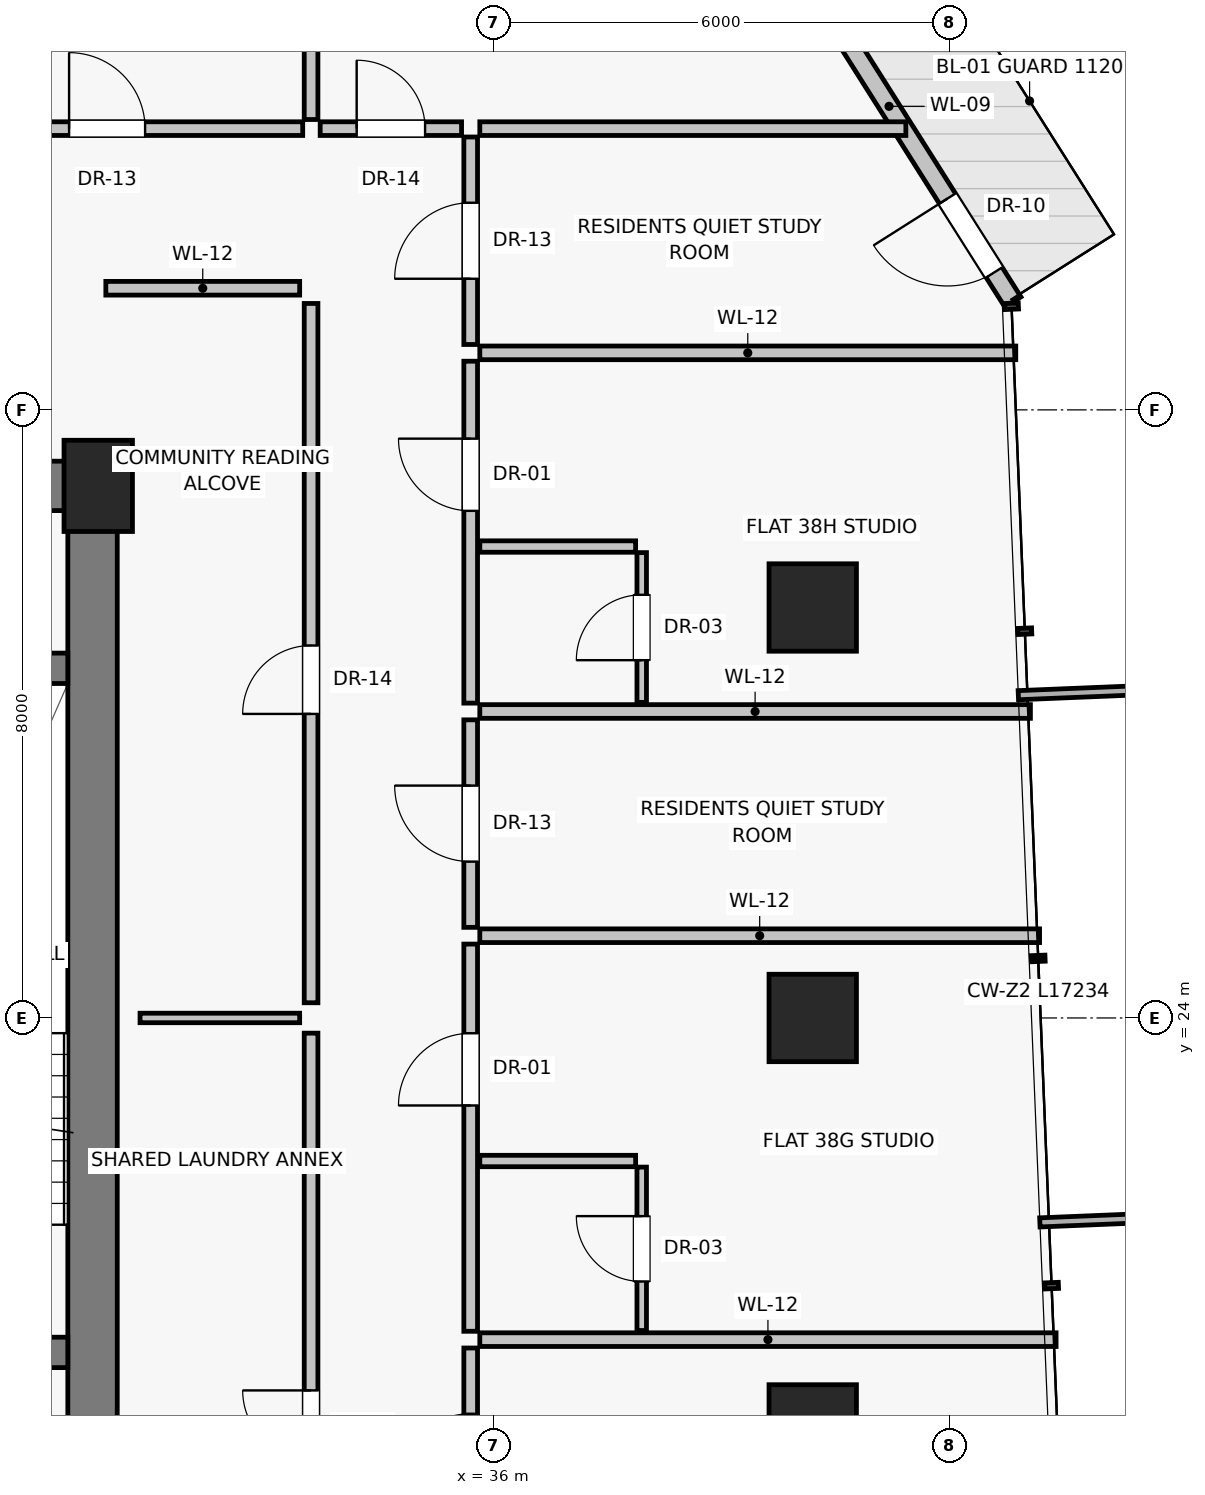
"""IFC4 building model, lengths in metres.
Left out: names, types, materials, properties, quantities, classifications, styles, units other than length and angle.
Written with IfcOpenShell. Run it as: python <this file> out.ifc"""

import sys

from ifc_helpers import new_model, si_unit, direction, frame, frame_2d, origin, origin_2d, place, context, subcontext, project, spatial, rectangle, extrude, source, transform, mapped, element, fill, save


model = new_model("IFC4")
c1 = context("Model", 3, precision=1e-05, world=origin(), true_north=direction((0.0, 1.0)))
c2 = subcontext(c1, "Body", "Model", "MODEL_VIEW")
j1 = project(units=[si_unit("LENGTHUNIT", "METRE"), si_unit("PLANEANGLEUNIT", "RADIAN")], contexts=[c1])
p1 = place(None, origin())
s1 = spatial("IfcSite", under=j1, at=p1, CompositionType="ELEMENT")
p2 = place(p1, origin())
s2 = spatial("IfcBuilding", under=s1, at=p2, CompositionType="ELEMENT")
p3 = place(p2, frame((0.0, 0.0, 136.0)))
s3 = spatial("IfcBuildingStorey", under=s2, at=p3, CompositionType="ELEMENT", Elevation=136.0)
p4 = place(p3, frame((30.8, 31.0, 0.0), z_axis=(0.0, 0.0, 1.0), x_axis=(1.0, 0.0, 0.0)))
e1 = element("IfcColumn", 1, at=p4, inside=s3, PredefinedType="PILASTER", context=c2, shape_type="SweptSolid", body=[
    extrude(rectangle(XDim=0.9, YDim=1.2, at=origin_2d()), origin(), (0.0, 0.0, 1.0), 3.25),
])
for number, where, z_axis, x_axis in (
    (2, (40.2, 18.6, 0.0), (0.0, 0.0, 1.0), (1.0, 0.0, 0.0)),
    (3, (40.2, 24.0, 0.0), (0.0, 0.0, 1.0), (1.0, 0.0, 0.0)),
    (4, (40.2, 29.4, 0.0), (0.0, 0.0, 1.0), (1.0, 0.0, 0.0)),
):
    element("IfcColumn", number, at=place(p3, frame(where, z_axis=z_axis, x_axis=x_axis)), inside=s3, PredefinedType="COLUMN", context=c2, shape_type="SweptSolid", body=[
        extrude(rectangle(XDim=1.15, YDim=1.15, at=origin_2d()), origin(), (0.0, 0.0, 1.0), 3.25),
    ])
p5 = place(p3, frame((42.833, 33.419, 0.0), z_axis=(0.0, 0.0, 1.0), x_axis=(-0.534940933302, 0.84488945897, 0.0)))
e5 = element("IfcWall", 5, at=p5, inside=s3, PredefinedType="SOLIDWALL", context=c2, shape_type="SweptSolid", body=[
    extrude(rectangle(XDim=4.233, YDim=0.25, at=frame_2d((2.116, 0.0))), origin(), (0.0, 0.0, 1.0), 3.0),
])
p6 = place(p5, frame((0.46, 0.0, 0.0)))
e6 = element("IfcOpeningElement", 6, at=p6, cuts=e5, PredefinedType="OPENING", context=c2, shape_type="SweptSolid", body=[
    extrude(rectangle(XDim=1.15, YDim=2.25, at=frame_2d((0.575, 1.125))), frame((0.0, 0.135, 0.0), z_axis=(0.0, -1.0, 0.0), x_axis=(1.0, 0.0, 0.0)), (0.0, 0.0, 1.0), 0.27),
])
p7 = place(p3, frame((30.725, 16.8, 0.0), z_axis=(0.0, 0.0, 1.0), x_axis=(0.0, 1.0, 0.0)))
e7 = element("IfcWall", 7, at=p7, inside=s3, PredefinedType="SHEAR", context=c2, shape_type="SweptSolid", body=[
    extrude(rectangle(XDim=14.2, YDim=0.65, at=frame_2d((7.1, 0.0))), origin(), (0.0, 0.0, 1.0), 3.0),
])
p8 = place(p3, frame((27.0, 31.0, 0.0), z_axis=(0.0, 0.0, 1.0), x_axis=(1.0, 0.0, 0.0)))
e8 = element("IfcWall", 8, at=p8, inside=s3, PredefinedType="SHEAR", context=c2, shape_type="SweptSolid", body=[
    extrude(rectangle(XDim=3.8, YDim=0.65, at=frame_2d((1.9, 0.0))), origin(), (0.0, 0.0, 1.0), 3.0),
])
p9 = place(p8, frame((0.45, 0.0, 0.0)))
e9 = element("IfcOpeningElement", 9, at=p9, cuts=e8, PredefinedType="OPENING", context=c2, shape_type="SweptSolid", body=[
    extrude(rectangle(XDim=0.86, YDim=2.01, at=frame_2d((0.43, 1.005))), frame((0.0, 0.335, 0.0), z_axis=(0.0, -1.0, 0.0), x_axis=(1.0, 0.0, 0.0)), (0.0, 0.0, 1.0), 0.67),
])
p10 = place(p8, frame((1.9, 0.0, 0.0)))
e10 = element("IfcOpeningElement", 10, at=p10, cuts=e8, PredefinedType="OPENING", context=c2, shape_type="SweptSolid", body=[
    extrude(rectangle(XDim=0.86, YDim=2.01, at=frame_2d((0.43, 1.005))), frame((0.0, 0.335, 0.0), z_axis=(0.0, -1.0, 0.0), x_axis=(1.0, 0.0, 0.0)), (0.0, 0.0, 1.0), 0.67),
])
p11 = place(p3, frame((27.0, 19.6, 0.0), z_axis=(0.0, 0.0, 1.0), x_axis=(1.0, 0.0, 0.0)))
e11 = element("IfcWall", 11, at=p11, inside=s3, PredefinedType="SHEAR", context=c2, shape_type="SweptSolid", body=[
    extrude(rectangle(XDim=3.4, YDim=0.4, at=frame_2d((1.7, 0.0))), origin(), (0.0, 0.0, 1.0), 3.0),
])
p12 = place(p11, frame((1.05, 0.0, 0.0)))
e12 = element("IfcOpeningElement", 12, at=p12, cuts=e11, PredefinedType="OPENING", context=c2, shape_type="SweptSolid", body=[
    extrude(rectangle(XDim=1.1, YDim=2.03, at=frame_2d((0.55, 1.015))), frame((0.0, 0.21, 0.0), z_axis=(0.0, -1.0, 0.0), x_axis=(1.0, 0.0, 0.0)), (0.0, 0.0, 1.0), 0.42),
])
p13 = place(p3, frame((27.0, 28.6, 0.0), z_axis=(0.0, 0.0, 1.0), x_axis=(1.0, 0.0, 0.0)))
e13 = element("IfcWall", 13, at=p13, inside=s3, PredefinedType="SHEAR", context=c2, shape_type="SweptSolid", body=[
    extrude(rectangle(XDim=3.4, YDim=0.4, at=frame_2d((1.7, 0.0))), origin(), (0.0, 0.0, 1.0), 3.0),
])
p14 = place(p3, frame((33.6, 14.4, 0.0), z_axis=(0.0, 0.0, 1.0), x_axis=(0.0, 1.0, 0.0)))
e14 = element("IfcWall", 14, at=p14, inside=s3, PredefinedType="PARTITIONING", context=c2, shape_type="SweptSolid", body=[
    extrude(rectangle(XDim=9.4, YDim=0.18, at=frame_2d((4.7, 0.0))), origin(), (0.0, 0.0, 1.0), 3.0),
])
p15 = place(p14, frame((3.8, 0.0, 0.0)))
e15 = element("IfcOpeningElement", 15, at=p15, cuts=e14, PredefinedType="OPENING", context=c2, shape_type="SweptSolid", body=[
    extrude(rectangle(XDim=0.9, YDim=2.01, at=frame_2d((0.45, 1.005))), frame((0.0, 0.1, 0.0), z_axis=(0.0, -1.0, 0.0), x_axis=(1.0, 0.0, 0.0)), (0.0, 0.0, 1.0), 0.2),
])
p16 = place(p3, frame((33.6, 24.2, 0.0), z_axis=(0.0, 0.0, 1.0), x_axis=(0.0, 1.0, 0.0)))
e16 = element("IfcWall", 16, at=p16, inside=s3, PredefinedType="PARTITIONING", context=c2, shape_type="SweptSolid", body=[
    extrude(rectangle(XDim=9.2, YDim=0.18, at=frame_2d((4.6, 0.0))), origin(), (0.0, 0.0, 1.0), 3.0),
])
p17 = place(p16, frame((3.8, 0.0, 0.0)))
e17 = element("IfcOpeningElement", 17, at=p17, cuts=e16, PredefinedType="OPENING", context=c2, shape_type="SweptSolid", body=[
    extrude(rectangle(XDim=0.9, YDim=2.01, at=frame_2d((0.45, 1.005))), frame((0.0, 0.1, 0.0), z_axis=(0.0, -1.0, 0.0), x_axis=(1.0, 0.0, 0.0)), (0.0, 0.0, 1.0), 0.2),
])
p18 = place(p3, frame((31.35, 24.0, 0.0), z_axis=(0.0, 0.0, 1.0), x_axis=(1.0, 0.0, 0.0)))
e18 = element("IfcWall", 18, at=p18, inside=s3, PredefinedType="PARTITIONING", context=c2, shape_type="SweptSolid", body=[
    extrude(rectangle(XDim=2.1, YDim=0.125, at=frame_2d((1.05, 0.0))), origin(), (0.0, 0.0, 1.0), 3.0),
])
p19 = place(p3, frame((30.9, 33.6, 0.0), z_axis=(0.0, 0.0, 1.0), x_axis=(1.0, 0.0, 0.0)))
e19 = element("IfcWall", 19, at=p19, inside=s3, PredefinedType="PARTITIONING", context=c2, shape_type="SweptSolid", body=[
    extrude(rectangle(XDim=2.55, YDim=0.18, at=frame_2d((1.275, 0.0))), origin(), (0.0, 0.0, 1.0), 3.0),
])
p20 = place(p3, frame((33.6, 35.82, 0.0), z_axis=(0.0, 0.0, 1.0), x_axis=(0.0, 1.0, 0.0)))
e20 = element("IfcWall", 20, at=p20, inside=s3, PredefinedType="PARTITIONING", context=c2, shape_type="SweptSolid", body=[
    extrude(rectangle(XDim=4.84, YDim=0.18, at=frame_2d((2.42, 0.0))), origin(), (0.0, 0.0, 1.0), 3.0),
])
p21 = place(p3, frame((28.343, 35.7, 0.0), z_axis=(0.0, 0.0, 1.0), x_axis=(1.0, 0.0, 0.0)))
e21 = element("IfcWall", 21, at=p21, inside=s3, PredefinedType="PARTITIONING", context=c2, shape_type="SweptSolid", body=[
    extrude(rectangle(XDim=5.147, YDim=0.18, at=frame_2d((2.573, 0.0))), origin(), (0.0, 0.0, 1.0), 2.58),
])
p22 = place(p21, frame((2.073, 0.0, 0.0)))
e22 = element("IfcOpeningElement", 22, at=p22, cuts=e21, PredefinedType="OPENING", context=c2, shape_type="SweptSolid", body=[
    extrude(rectangle(XDim=1.0, YDim=2.01, at=frame_2d((0.5, 1.005))), frame((0.0, 0.1, 0.0), z_axis=(0.0, -1.0, 0.0), x_axis=(1.0, 0.0, 0.0)), (0.0, 0.0, 1.0), 0.2),
])
p23 = place(p3, frame((35.82, 35.7, 0.0), z_axis=(0.0, 0.0, 1.0), x_axis=(1.0, 0.0, 0.0)))
e23 = element("IfcWall", 23, at=p23, inside=s3, PredefinedType="PARTITIONING", context=c2, shape_type="SweptSolid", body=[
    extrude(rectangle(XDim=5.605, YDim=0.18, at=frame_2d((2.802, 0.0))), origin(), (0.0, 0.0, 1.0), 3.0),
])
p24 = place(p3, frame((35.7, 16.928, 0.0), z_axis=(0.0, 0.0, 1.0), x_axis=(0.0, 1.0, 0.0)))
e24 = element("IfcWall", 24, at=p24, inside=s3, PredefinedType="PARTITIONING", context=c2, shape_type="SweptSolid", body=[
    extrude(rectangle(XDim=2.73, YDim=0.18, at=frame_2d((1.365, 0.0))), origin(), (0.0, 0.0, 1.0), 2.58),
])
p25 = place(p24, frame((0.865, 0.0, 0.0)))
e25 = element("IfcOpeningElement", 25, at=p25, cuts=e24, PredefinedType="OPENING", context=c2, shape_type="SweptSolid", body=[
    extrude(rectangle(XDim=1.0, YDim=2.01, at=frame_2d((0.5, 1.005))), frame((0.0, 0.1, 0.0), z_axis=(0.0, -1.0, 0.0), x_axis=(1.0, 0.0, 0.0)), (0.0, 0.0, 1.0), 0.2),
])
p26 = place(p3, frame((35.82, 19.768, 0.0), z_axis=(0.0, 0.0, 1.0), x_axis=(1.0, 0.0, 0.0)))
e26 = element("IfcWall", 26, at=p26, inside=s3, PredefinedType="PARTITIONING", context=c2, shape_type="SweptSolid", body=[
    extrude(rectangle(XDim=7.582, YDim=0.18, at=frame_2d((3.791, 0.0))), origin(), (0.0, 0.0, 1.0), 3.0),
])
p27 = place(p3, frame((35.7, 25.192, 0.0), z_axis=(0.0, 0.0, 1.0), x_axis=(0.0, 1.0, 0.0)))
e27 = element("IfcWall", 27, at=p27, inside=s3, PredefinedType="PARTITIONING", context=c2, shape_type="SweptSolid", body=[
    extrude(rectangle(XDim=2.73, YDim=0.18, at=frame_2d((1.365, 0.0))), origin(), (0.0, 0.0, 1.0), 2.58),
])
p28 = place(p27, frame((0.865, 0.0, 0.0)))
e28 = element("IfcOpeningElement", 28, at=p28, cuts=e27, PredefinedType="OPENING", context=c2, shape_type="SweptSolid", body=[
    extrude(rectangle(XDim=1.0, YDim=2.01, at=frame_2d((0.5, 1.005))), frame((0.0, 0.1, 0.0), z_axis=(0.0, -1.0, 0.0), x_axis=(1.0, 0.0, 0.0)), (0.0, 0.0, 1.0), 0.2),
])
p29 = place(p3, frame((35.82, 25.082, 0.0), z_axis=(0.0, 0.0, 1.0), x_axis=(1.0, 0.0, 0.0)))
e29 = element("IfcWall", 29, at=p29, inside=s3, PredefinedType="PARTITIONING", context=c2, shape_type="SweptSolid", body=[
    extrude(rectangle(XDim=7.364, YDim=0.18, at=frame_2d((3.682, 0.0))), origin(), (0.0, 0.0, 1.0), 3.0),
])
p30 = place(p3, frame((35.7, 19.878, 0.0), z_axis=(0.0, 0.0, 1.0), x_axis=(0.0, 1.0, 0.0)))
e30 = element("IfcWall", 30, at=p30, inside=s3, PredefinedType="PARTITIONING", context=c2, shape_type="SweptSolid", body=[
    extrude(rectangle(XDim=5.094, YDim=0.18, at=frame_2d((2.547, 0.0))), origin(), (0.0, 0.0, 1.0), 2.58),
])
p31 = place(p30, frame((2.971, 0.0, 0.0)))
e31 = element("IfcOpeningElement", 31, at=p31, cuts=e30, PredefinedType="OPENING", context=c2, shape_type="SweptSolid", body=[
    extrude(rectangle(XDim=0.95, YDim=2.02, at=frame_2d((0.475, 1.01))), frame((0.0, 0.1, 0.0), z_axis=(0.0, -1.0, 0.0), x_axis=(1.0, 0.0, 0.0)), (0.0, 0.0, 1.0), 0.2),
])
p32 = place(p3, frame((35.82, 22.118, 0.0), z_axis=(0.0, 0.0, 1.0), x_axis=(1.0, 0.0, 0.0)))
e32 = element("IfcWall", 32, at=p32, inside=s3, PredefinedType="PARTITIONING", context=c2, shape_type="SweptSolid", body=[
    extrude(rectangle(XDim=2.05, YDim=0.15, at=frame_2d((1.025, 0.0))), origin(), (0.0, 0.0, 1.0), 3.0),
])
p33 = place(p3, frame((37.95, 19.888, 0.0), z_axis=(0.0, 0.0, 1.0), x_axis=(0.0, 1.0, 0.0)))
e33 = element("IfcWall", 33, at=p33, inside=s3, PredefinedType="PARTITIONING", context=c2, shape_type="SweptSolid", body=[
    extrude(rectangle(XDim=2.15, YDim=0.125, at=frame_2d((1.075, 0.0))), origin(), (0.0, 0.0, 1.0), 3.0),
])
p34 = place(p33, frame((0.645, 0.0, 0.0)))
e34 = element("IfcOpeningElement", 34, at=p34, cuts=e33, PredefinedType="OPENING", context=c2, shape_type="SweptSolid", body=[
    extrude(rectangle(XDim=0.86, YDim=2.01, at=frame_2d((0.43, 1.005))), frame((0.0, 0.073, 0.0), z_axis=(0.0, -1.0, 0.0), x_axis=(1.0, 0.0, 0.0)), (0.0, 0.0, 1.0), 0.145),
])
p35 = place(p3, frame((35.82, 28.032, 0.0), z_axis=(0.0, 0.0, 1.0), x_axis=(1.0, 0.0, 0.0)))
e35 = element("IfcWall", 35, at=p35, inside=s3, PredefinedType="PARTITIONING", context=c2, shape_type="SweptSolid", body=[
    extrude(rectangle(XDim=7.244, YDim=0.18, at=frame_2d((3.622, 0.0))), origin(), (0.0, 0.0, 1.0), 3.0),
])
p36 = place(p3, frame((35.7, 32.86, 0.0), z_axis=(0.0, 0.0, 1.0), x_axis=(0.0, 1.0, 0.0)))
e36 = element("IfcWall", 36, at=p36, inside=s3, PredefinedType="PARTITIONING", context=c2, shape_type="SweptSolid", body=[
    extrude(rectangle(XDim=2.73, YDim=0.18, at=frame_2d((1.365, 0.0))), origin(), (0.0, 0.0, 1.0), 3.0),
])
p37 = place(p36, frame((0.865, 0.0, 0.0)))
e37 = element("IfcOpeningElement", 37, at=p37, cuts=e36, PredefinedType="OPENING", context=c2, shape_type="SweptSolid", body=[
    extrude(rectangle(XDim=1.0, YDim=2.01, at=frame_2d((0.5, 1.005))), frame((0.0, 0.1, 0.0), z_axis=(0.0, -1.0, 0.0), x_axis=(1.0, 0.0, 0.0)), (0.0, 0.0, 1.0), 0.2),
])
p38 = place(p3, frame((35.82, 32.75, 0.0), z_axis=(0.0, 0.0, 1.0), x_axis=(1.0, 0.0, 0.0)))
e38 = element("IfcWall", 38, at=p38, inside=s3, PredefinedType="PARTITIONING", context=c2, shape_type="SweptSolid", body=[
    extrude(rectangle(XDim=7.051, YDim=0.18, at=frame_2d((3.525, 0.0))), origin(), (0.0, 0.0, 1.0), 3.0),
])
p39 = place(p3, frame((35.7, 28.142, 0.0), z_axis=(0.0, 0.0, 1.0), x_axis=(0.0, 1.0, 0.0)))
e39 = element("IfcWall", 39, at=p39, inside=s3, PredefinedType="PARTITIONING", context=c2, shape_type="SweptSolid", body=[
    extrude(rectangle(XDim=4.498, YDim=0.18, at=frame_2d((2.249, 0.0))), origin(), (0.0, 0.0, 1.0), 2.58),
])
p40 = place(p39, frame((2.53, 0.0, 0.0)))
e40 = element("IfcOpeningElement", 40, at=p40, cuts=e39, PredefinedType="OPENING", context=c2, shape_type="SweptSolid", body=[
    extrude(rectangle(XDim=0.95, YDim=2.02, at=frame_2d((0.475, 1.01))), frame((0.0, 0.1, 0.0), z_axis=(0.0, -1.0, 0.0), x_axis=(1.0, 0.0, 0.0)), (0.0, 0.0, 1.0), 0.2),
])
p41 = place(p3, frame((35.82, 30.202, 0.0), z_axis=(0.0, 0.0, 1.0), x_axis=(1.0, 0.0, 0.0)))
e41 = element("IfcWall", 41, at=p41, inside=s3, PredefinedType="PARTITIONING", context=c2, shape_type="SweptSolid", body=[
    extrude(rectangle(XDim=2.05, YDim=0.15, at=frame_2d((1.025, 0.0))), origin(), (0.0, 0.0, 1.0), 2.378),
])
p42 = place(p3, frame((37.95, 28.152, 0.0), z_axis=(0.0, 0.0, 1.0), x_axis=(0.0, 1.0, 0.0)))
e42 = element("IfcWall", 42, at=p42, inside=s3, PredefinedType="PARTITIONING", context=c2, shape_type="SweptSolid", body=[
    extrude(rectangle(XDim=1.97, YDim=0.125, at=frame_2d((0.985, 0.0))), origin(), (0.0, 0.0, 1.0), 3.0),
])
p43 = place(p42, frame((0.555, 0.0, 0.0)))
e43 = element("IfcOpeningElement", 43, at=p43, cuts=e42, PredefinedType="OPENING", context=c2, shape_type="SweptSolid", body=[
    extrude(rectangle(XDim=0.86, YDim=2.01, at=frame_2d((0.43, 1.005))), frame((0.0, 0.073, 0.0), z_axis=(0.0, -1.0, 0.0), x_axis=(1.0, 0.0, 0.0)), (0.0, 0.0, 1.0), 0.145),
])
p44 = place(p3, frame((33.72, 35.7, 0.0), z_axis=(0.0, 0.0, 1.0), x_axis=(1.0, 0.0, 0.0)))
e44 = element("IfcWall", 44, at=p44, inside=s3, PredefinedType="PARTITIONING", context=c2, shape_type="SweptSolid", body=[
    extrude(rectangle(XDim=1.86, YDim=0.18, at=frame_2d((0.93, 0.0))), origin(), (0.0, 0.0, 1.0), 3.0),
])
p45 = place(p44, frame((0.48, 0.0, 0.0)))
e45 = element("IfcOpeningElement", 45, at=p45, cuts=e44, PredefinedType="OPENING", context=c2, shape_type="SweptSolid", body=[
    extrude(rectangle(XDim=0.9, YDim=2.01, at=frame_2d((0.45, 1.005))), frame((0.0, 0.1, 0.0), z_axis=(0.0, -1.0, 0.0), x_axis=(1.0, 0.0, 0.0)), (0.0, 0.0, 1.0), 0.2),
])
m1 = source(origin(), c2, "Body", "SweptSolid", [
    extrude(rectangle(XDim=1.15, YDim=2.25, at=frame_2d((0.575, 1.125))), frame((0.0, 0.025, 0.0), z_axis=(0.0, -1.0, 0.0), x_axis=(1.0, 0.0, 0.0)), (0.0, 0.0, 1.0), 0.05),
])
p46 = place(p6, frame((1.15, 0.0, 0.0), z_axis=(0.0, 0.0, 1.0), x_axis=(-1.0, 0.0, 0.0)))
e46 = element("IfcDoor", 46, at=p46, inside=s3, OperationType="SINGLE_SWING_RIGHT", PredefinedType="DOOR", context=c2, shape_type="MappedRepresentation", body=[
    mapped(m1, transform((0.0, 0.0, 0.0), scale=1.0)),
])
fill(e6, e46)
m2 = source(origin(), c2, "Body", "SweptSolid", [
    extrude(rectangle(XDim=0.9, YDim=2.01, at=frame_2d((0.45, 1.005))), frame((0.0, 0.025, 0.0), z_axis=(0.0, -1.0, 0.0), x_axis=(1.0, 0.0, 0.0)), (0.0, 0.0, 1.0), 0.05),
])
p47 = place(p15, origin())
e47 = element("IfcDoor", 47, at=p47, inside=s3, OperationType="SINGLE_SWING_RIGHT", PredefinedType="DOOR", context=c2, shape_type="MappedRepresentation", body=[
    mapped(m2, transform((0.0, 0.0, 0.0), scale=1.0)),
])
fill(e15, e47)
p48 = place(p17, origin())
e48 = element("IfcDoor", 48, at=p48, inside=s3, OperationType="SINGLE_SWING_LEFT", PredefinedType="DOOR", context=c2, shape_type="MappedRepresentation", body=[
    mapped(m2, transform((0.0, 0.0, 0.0), scale=1.0)),
])
fill(e17, e48)
m3 = source(origin(), c2, "Body", "SweptSolid", [
    extrude(rectangle(XDim=1.0, YDim=2.01, at=frame_2d((0.5, 1.005))), frame((0.0, 0.025, 0.0), z_axis=(0.0, -1.0, 0.0), x_axis=(1.0, 0.0, 0.0)), (0.0, 0.0, 1.0), 0.05),
])
p49 = place(p22, origin())
e49 = element("IfcDoor", 49, at=p49, inside=s3, OperationType="SINGLE_SWING_LEFT", PredefinedType="DOOR", context=c2, shape_type="MappedRepresentation", body=[
    mapped(m3, transform((0.0, 0.0, 0.0), scale=1.0)),
])
fill(e22, e49)
p50 = place(p25, origin())
e50 = element("IfcDoor", 50, at=p50, inside=s3, OperationType="SINGLE_SWING_LEFT", PredefinedType="DOOR", context=c2, shape_type="MappedRepresentation", body=[
    mapped(m3, transform((0.0, 0.0, 0.0), scale=1.0)),
])
fill(e25, e50)
p51 = place(p28, origin())
e51 = element("IfcDoor", 51, at=p51, inside=s3, OperationType="SINGLE_SWING_RIGHT", PredefinedType="DOOR", context=c2, shape_type="MappedRepresentation", body=[
    mapped(m3, transform((0.0, 0.0, 0.0), scale=1.0)),
])
fill(e28, e51)
m4 = source(origin(), c2, "Body", "SweptSolid", [
    extrude(rectangle(XDim=0.95, YDim=2.02, at=frame_2d((0.475, 1.01))), frame((0.0, 0.025, 0.0), z_axis=(0.0, -1.0, 0.0), x_axis=(1.0, 0.0, 0.0)), (0.0, 0.0, 1.0), 0.05),
])
p52 = place(p31, origin())
e52 = element("IfcDoor", 52, at=p52, inside=s3, OperationType="SINGLE_SWING_LEFT", PredefinedType="DOOR", context=c2, shape_type="MappedRepresentation", body=[
    mapped(m4, transform((0.0, 0.0, 0.0), scale=1.0)),
])
fill(e31, e52)
m5 = source(origin(), c2, "Body", "SweptSolid", [
    extrude(rectangle(XDim=0.86, YDim=2.01, at=frame_2d((0.43, 1.005))), frame((0.0, 0.025, 0.0), z_axis=(0.0, -1.0, 0.0), x_axis=(1.0, 0.0, 0.0)), (0.0, 0.0, 1.0), 0.05),
])
p53 = place(p34, origin())
e53 = element("IfcDoor", 53, at=p53, inside=s3, OperationType="SINGLE_SWING_RIGHT", PredefinedType="DOOR", context=c2, shape_type="MappedRepresentation", body=[
    mapped(m5, transform((0.0, 0.0, 0.0), scale=1.0)),
])
fill(e34, e53)
p54 = place(p37, origin())
e54 = element("IfcDoor", 54, at=p54, inside=s3, OperationType="SINGLE_SWING_LEFT", PredefinedType="DOOR", context=c2, shape_type="MappedRepresentation", body=[
    mapped(m3, transform((0.0, 0.0, 0.0), scale=1.0)),
])
fill(e37, e54)
p55 = place(p40, origin())
e55 = element("IfcDoor", 55, at=p55, inside=s3, OperationType="SINGLE_SWING_RIGHT", PredefinedType="DOOR", context=c2, shape_type="MappedRepresentation", body=[
    mapped(m4, transform((0.0, 0.0, 0.0), scale=1.0)),
])
fill(e40, e55)
p56 = place(p43, origin())
e56 = element("IfcDoor", 56, at=p56, inside=s3, OperationType="SINGLE_SWING_LEFT", PredefinedType="DOOR", context=c2, shape_type="MappedRepresentation", body=[
    mapped(m5, transform((0.0, 0.0, 0.0), scale=1.0)),
])
fill(e43, e56)
p57 = place(p45, origin())
e57 = element("IfcDoor", 57, at=p57, inside=s3, OperationType="SINGLE_SWING_LEFT", PredefinedType="DOOR", context=c2, shape_type="MappedRepresentation", body=[
    mapped(m2, transform((0.0, 0.0, 0.0), scale=1.0)),
])
fill(e45, e57)
save(model, sys.argv[1])
